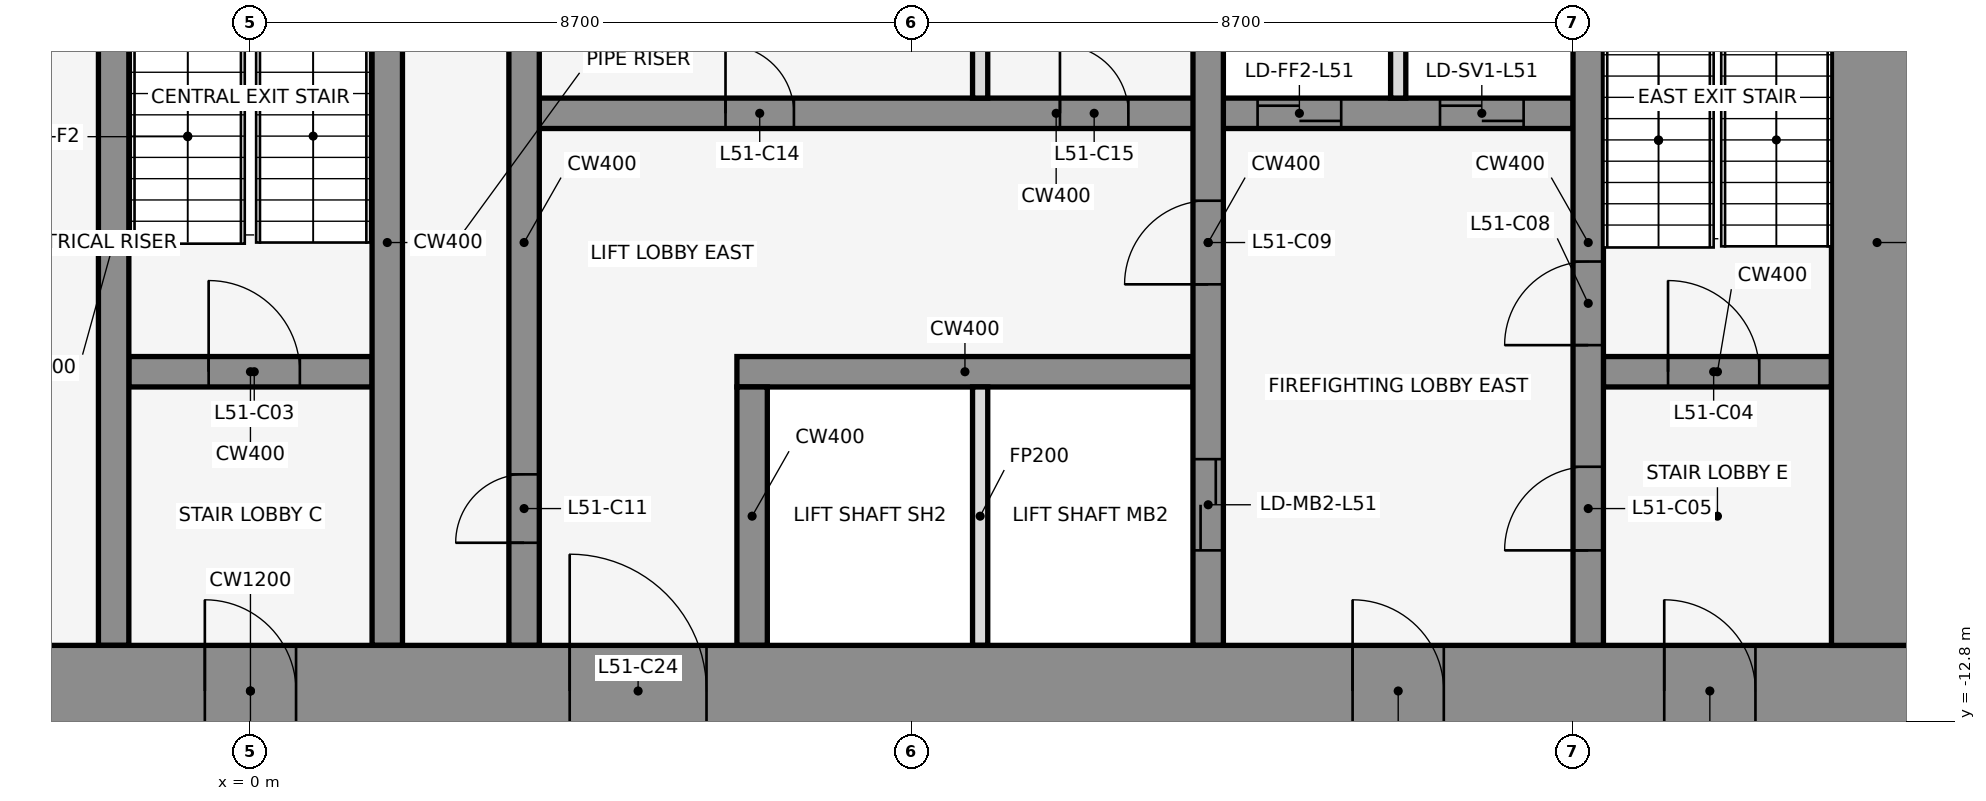
"""IFC4 building model, lengths in metres.
Left out: names, types, materials, properties, quantities, classifications, styles, units other than length and angle.
Written with IfcOpenShell. Run it as: python <this file> out.ifc"""

import sys

from ifc_helpers import new_model, si_unit, direction, frame, frame_2d, origin, place, context, subcontext, project, spatial, rectangle, extrude, element, fill, save


model = new_model("IFC4")
c1 = context("Model", 3, precision=1e-05, world=origin(), true_north=direction((0.0, 1.0)))
c2 = subcontext(c1, "Body", "Model", "MODEL_VIEW")
j1 = project(units=[si_unit("LENGTHUNIT", "METRE"), si_unit("PLANEANGLEUNIT", "RADIAN")], contexts=[c1])
p1 = place(None, origin())
s1 = spatial("IfcSite", under=j1, at=p1, CompositionType="ELEMENT")
p2 = place(p1, origin())
s2 = spatial("IfcBuilding", under=s1, at=p2, CompositionType="ELEMENT")
p3 = place(p2, frame((0.0, 0.0, 227.8)))
s3 = spatial("IfcBuildingStorey", under=s2, at=p3, CompositionType="ELEMENT", Elevation=227.8)
p4 = place(p3, frame((-1.6, -8.2, 0.0), z_axis=(0.0, 0.0, 1.0), x_axis=(1.0, 0.0, 0.0)))
e1 = element("IfcWall", 1, at=p4, inside=s3, PredefinedType="SHEAR", context=c2, shape_type="SweptSolid", body=[
    extrude(rectangle(XDim=3.2, YDim=0.4, at=frame_2d((1.6, 0.0))), origin(), (0.0, 0.0, 1.0), 4.1),
])
p5 = place(p4, frame((1.05, 0.0, 0.0)))
e2 = element("IfcOpeningElement", 2, at=p5, cuts=e1, PredefinedType="OPENING", context=c2, shape_type="SweptSolid", body=[
    extrude(rectangle(XDim=1.2, YDim=2.1, at=frame_2d((0.6, 1.05))), frame((0.0, 0.212, 0.0), z_axis=(0.0, -1.0, 0.0), x_axis=(1.0, 0.0, 0.0)), (0.0, 0.0, 1.0), 0.424),
])
p6 = place(p3, frame((6.4, -8.2, 0.0), z_axis=(0.0, 0.0, 1.0), x_axis=(1.0, 0.0, 0.0)))
e3 = element("IfcWall", 3, at=p6, inside=s3, PredefinedType="SHEAR", context=c2, shape_type="SweptSolid", body=[
    extrude(rectangle(XDim=6.0, YDim=0.4, at=frame_2d((3.0, 0.0))), origin(), (0.0, 0.0, 1.0), 4.1),
])
p7 = place(p3, frame((17.8, -8.2, 0.0), z_axis=(0.0, 0.0, 1.0), x_axis=(1.0, 0.0, 0.0)))
e4 = element("IfcWall", 4, at=p7, inside=s3, PredefinedType="SHEAR", context=c2, shape_type="SweptSolid", body=[
    extrude(rectangle(XDim=3.0, YDim=0.4, at=frame_2d((1.5, 0.0))), origin(), (0.0, 0.0, 1.0), 4.1),
])
p8 = place(p7, frame((0.85, 0.0, 0.0)))
e5 = element("IfcOpeningElement", 5, at=p8, cuts=e4, PredefinedType="OPENING", context=c2, shape_type="SweptSolid", body=[
    extrude(rectangle(XDim=1.2, YDim=2.1, at=frame_2d((0.6, 1.05))), frame((0.0, 0.212, 0.0), z_axis=(0.0, -1.0, 0.0), x_axis=(1.0, 0.0, 0.0)), (0.0, 0.0, 1.0), 0.424),
])
p9 = place(p3, frame((3.8, -4.8, 0.0), z_axis=(0.0, 0.0, 1.0), x_axis=(1.0, 0.0, 0.0)))
e6 = element("IfcWall", 6, at=p9, inside=s3, PredefinedType="SHEAR", context=c2, shape_type="SweptSolid", body=[
    extrude(rectangle(XDim=13.6, YDim=0.4, at=frame_2d((6.8, 0.0))), origin(), (0.0, 0.0, 1.0), 4.1),
])
p10 = place(p9, frame((9.45, 0.0, 0.0)))
e7 = element("IfcOpeningElement", 7, at=p10, cuts=e6, PredefinedType="OPENING", context=c2, shape_type="SweptSolid", body=[
    extrude(rectangle(XDim=1.1, YDim=2.1, at=frame_2d((0.55, 1.05))), frame((0.0, 0.212, 0.0), z_axis=(0.0, -1.0, 0.0), x_axis=(1.0, 0.0, 0.0)), (0.0, 0.0, 1.0), 0.424),
])
p11 = place(p9, frame((11.85, 0.0, 0.0)))
e8 = element("IfcOpeningElement", 8, at=p11, cuts=e6, PredefinedType="OPENING", context=c2, shape_type="SweptSolid", body=[
    extrude(rectangle(XDim=1.1, YDim=2.1, at=frame_2d((0.55, 1.05))), frame((0.0, 0.212, 0.0), z_axis=(0.0, -1.0, 0.0), x_axis=(1.0, 0.0, 0.0)), (0.0, 0.0, 1.0), 0.424),
])
p12 = place(p9, frame((2.45, 0.0, 0.0)))
e9 = element("IfcOpeningElement", 9, at=p12, cuts=e6, PredefinedType="OPENING", context=c2, shape_type="SweptSolid", body=[
    extrude(rectangle(XDim=0.9, YDim=2.1, at=frame_2d((0.45, 1.05))), frame((0.0, 0.212, 0.0), z_axis=(0.0, -1.0, 0.0), x_axis=(1.0, 0.0, 0.0)), (0.0, 0.0, 1.0), 0.424),
])
p13 = place(p9, frame((6.85, 0.0, 0.0)))
e10 = element("IfcOpeningElement", 10, at=p13, cuts=e6, PredefinedType="OPENING", context=c2, shape_type="SweptSolid", body=[
    extrude(rectangle(XDim=0.9, YDim=2.1, at=frame_2d((0.45, 1.05))), frame((0.0, 0.212, 0.0), z_axis=(0.0, -1.0, 0.0), x_axis=(1.0, 0.0, 0.0)), (0.0, 0.0, 1.0), 0.424),
])
for number, where, z_axis, x_axis in (
    (11, (-1.8, -11.8, 0.0), (0.0, 0.0, 1.0), (0.0, 1.0, 0.0)),
    (12, (1.8, -11.8, 0.0), (0.0, 0.0, 1.0), (0.0, 1.0, 0.0)),
):
    element("IfcWall", number, at=place(p3, frame(where, z_axis=z_axis, x_axis=x_axis)), inside=s3, PredefinedType="SHEAR", context=c2, shape_type="SweptSolid", body=[
        extrude(rectangle(XDim=10.6, YDim=0.4, at=frame_2d((5.3, 0.0))), origin(), (0.0, 0.0, 1.0), 4.1),
    ])
p14 = place(p3, frame((3.6, -11.8, 0.0), z_axis=(0.0, 0.0, 1.0), x_axis=(0.0, 1.0, 0.0)))
e13 = element("IfcWall", 13, at=p14, inside=s3, PredefinedType="SHEAR", context=c2, shape_type="SweptSolid", body=[
    extrude(rectangle(XDim=10.6, YDim=0.4, at=frame_2d((5.3, 0.0))), origin(), (0.0, 0.0, 1.0), 4.1),
])
p15 = place(p14, frame((1.35, 0.0, 0.0)))
e14 = element("IfcOpeningElement", 14, at=p15, cuts=e13, PredefinedType="OPENING", context=c2, shape_type="SweptSolid", body=[
    extrude(rectangle(XDim=0.9, YDim=2.1, at=frame_2d((0.45, 1.05))), frame((0.0, 0.212, 0.0), z_axis=(0.0, -1.0, 0.0), x_axis=(1.0, 0.0, 0.0)), (0.0, 0.0, 1.0), 0.424),
])
p16 = place(p3, frame((6.6, -11.8, 0.0), z_axis=(0.0, 0.0, 1.0), x_axis=(0.0, 1.0, 0.0)))
e15 = element("IfcWall", 15, at=p16, inside=s3, PredefinedType="SHEAR", context=c2, shape_type="SweptSolid", body=[
    extrude(rectangle(XDim=3.4, YDim=0.4, at=frame_2d((1.7, 0.0))), origin(), (0.0, 0.0, 1.0), 4.1),
])
for number, where, z_axis, x_axis in (
    (16, (9.6, -11.8, 0.0), (0.0, 0.0, 1.0), (0.0, 1.0, 0.0)),
    (17, (9.6, -4.6, 0.0), (0.0, 0.0, 1.0), (0.0, 1.0, 0.0)),
):
    element("IfcWall", number, at=place(p3, frame(where, z_axis=z_axis, x_axis=x_axis)), inside=s3, PredefinedType="PARTITIONING", context=c2, shape_type="SweptSolid", body=[
        extrude(rectangle(XDim=3.4, YDim=0.2, at=frame_2d((1.7, 0.0))), origin(), (0.0, 0.0, 1.0), 2.84),
    ])
p17 = place(p3, frame((12.6, -11.8, 0.0), z_axis=(0.0, 0.0, 1.0), x_axis=(0.0, 1.0, 0.0)))
e18 = element("IfcWall", 18, at=p17, inside=s3, PredefinedType="SHEAR", context=c2, shape_type="SweptSolid", body=[
    extrude(rectangle(XDim=10.6, YDim=0.4, at=frame_2d((5.3, 0.0))), origin(), (0.0, 0.0, 1.0), 4.1),
])
p18 = place(p17, frame((1.25, 0.0, 0.0)))
e19 = element("IfcOpeningElement", 19, at=p18, cuts=e18, PredefinedType="OPENING", context=c2, shape_type="SweptSolid", body=[
    extrude(rectangle(XDim=1.2, YDim=2.1, at=frame_2d((0.6, 1.05))), frame((0.0, 0.212, 0.0), z_axis=(0.0, -1.0, 0.0), x_axis=(1.0, 0.0, 0.0)), (0.0, 0.0, 1.0), 0.424),
])
p19 = place(p17, frame((4.75, 0.0, 0.0)))
e20 = element("IfcOpeningElement", 20, at=p19, cuts=e18, PredefinedType="OPENING", context=c2, shape_type="SweptSolid", body=[
    extrude(rectangle(XDim=1.1, YDim=2.1, at=frame_2d((0.55, 1.05))), frame((0.0, 0.212, 0.0), z_axis=(0.0, -1.0, 0.0), x_axis=(1.0, 0.0, 0.0)), (0.0, 0.0, 1.0), 0.424),
])
p20 = place(p3, frame((15.1, -4.6, 0.0), z_axis=(0.0, 0.0, 1.0), x_axis=(0.0, 1.0, 0.0)))
e21 = element("IfcWall", 21, at=p20, inside=s3, PredefinedType="PARTITIONING", context=c2, shape_type="SweptSolid", body=[
    extrude(rectangle(XDim=3.4, YDim=0.2, at=frame_2d((1.7, 0.0))), origin(), (0.0, 0.0, 1.0), 2.84),
])
p21 = place(p3, frame((17.6, -11.8, 0.0), z_axis=(0.0, 0.0, 1.0), x_axis=(0.0, 1.0, 0.0)))
e22 = element("IfcWall", 22, at=p21, inside=s3, PredefinedType="SHEAR", context=c2, shape_type="SweptSolid", body=[
    extrude(rectangle(XDim=10.6, YDim=0.4, at=frame_2d((5.3, 0.0))), origin(), (0.0, 0.0, 1.0), 4.1),
])
p22 = place(p21, frame((1.25, 0.0, 0.0)))
e23 = element("IfcOpeningElement", 23, at=p22, cuts=e22, PredefinedType="OPENING", context=c2, shape_type="SweptSolid", body=[
    extrude(rectangle(XDim=1.1, YDim=2.1, at=frame_2d((0.55, 1.05))), frame((0.0, 0.212, 0.0), z_axis=(0.0, -1.0, 0.0), x_axis=(1.0, 0.0, 0.0)), (0.0, 0.0, 1.0), 0.424),
])
p23 = place(p21, frame((3.95, 0.0, 0.0)))
e24 = element("IfcOpeningElement", 24, at=p23, cuts=e22, PredefinedType="OPENING", context=c2, shape_type="SweptSolid", body=[
    extrude(rectangle(XDim=1.1, YDim=2.1, at=frame_2d((0.55, 1.05))), frame((0.0, 0.212, 0.0), z_axis=(0.0, -1.0, 0.0), x_axis=(1.0, 0.0, 0.0)), (0.0, 0.0, 1.0), 0.424),
])
p24 = place(p3, frame((-22.0, -12.4, 0.0), z_axis=(0.0, 0.0, 1.0), x_axis=(1.0, 0.0, 0.0)))
e25 = element("IfcWall", 25, at=p24, inside=s3, PredefinedType="SHEAR", context=c2, shape_type="SweptSolid", body=[
    extrude(rectangle(XDim=44.0, YDim=1.2, at=frame_2d((22.0, 0.0))), origin(), (0.0, 0.0, 1.0), 4.1),
])
p25 = place(p24, frame((2.2, 0.0, 0.0)))
e26 = element("IfcOpeningElement", 26, at=p25, cuts=e25, PredefinedType="OPENING", context=c2, shape_type="SweptSolid", body=[
    extrude(rectangle(XDim=1.2, YDim=2.1, at=frame_2d((0.6, 1.05))), frame((0.0, 0.612, 0.0), z_axis=(0.0, -1.0, 0.0), x_axis=(1.0, 0.0, 0.0)), (0.0, 0.0, 1.0), 1.224),
])
p26 = place(p24, frame((21.4, 0.0, 0.0)))
e27 = element("IfcOpeningElement", 27, at=p26, cuts=e25, PredefinedType="OPENING", context=c2, shape_type="SweptSolid", body=[
    extrude(rectangle(XDim=1.2, YDim=2.1, at=frame_2d((0.6, 1.05))), frame((0.0, 0.612, 0.0), z_axis=(0.0, -1.0, 0.0), x_axis=(1.0, 0.0, 0.0)), (0.0, 0.0, 1.0), 1.224),
])
p27 = place(p24, frame((40.6, 0.0, 0.0)))
e28 = element("IfcOpeningElement", 28, at=p27, cuts=e25, PredefinedType="OPENING", context=c2, shape_type="SweptSolid", body=[
    extrude(rectangle(XDim=1.2, YDim=2.1, at=frame_2d((0.6, 1.05))), frame((0.0, 0.612, 0.0), z_axis=(0.0, -1.0, 0.0), x_axis=(1.0, 0.0, 0.0)), (0.0, 0.0, 1.0), 1.224),
])
p28 = place(p24, frame((16.0, 0.0, 0.0)))
e29 = element("IfcOpeningElement", 29, at=p28, cuts=e25, PredefinedType="OPENING", context=c2, shape_type="SweptSolid", body=[
    extrude(rectangle(XDim=1.8, YDim=2.1, at=frame_2d((0.9, 1.05))), frame((0.0, 0.612, 0.0), z_axis=(0.0, -1.0, 0.0), x_axis=(1.0, 0.0, 0.0)), (0.0, 0.0, 1.0), 1.224),
])
p29 = place(p24, frame((6.3, 0.0, 0.0)))
e30 = element("IfcOpeningElement", 30, at=p29, cuts=e25, PredefinedType="OPENING", context=c2, shape_type="SweptSolid", body=[
    extrude(rectangle(XDim=1.2, YDim=2.1, at=frame_2d((0.6, 1.05))), frame((0.0, 0.612, 0.0), z_axis=(0.0, -1.0, 0.0), x_axis=(1.0, 0.0, 0.0)), (0.0, 0.0, 1.0), 1.224),
])
p30 = place(p24, frame((26.2, 0.0, 0.0)))
e31 = element("IfcOpeningElement", 31, at=p30, cuts=e25, PredefinedType="OPENING", context=c2, shape_type="SweptSolid", body=[
    extrude(rectangle(XDim=1.8, YDim=2.1, at=frame_2d((0.9, 1.05))), frame((0.0, 0.612, 0.0), z_axis=(0.0, -1.0, 0.0), x_axis=(1.0, 0.0, 0.0)), (0.0, 0.0, 1.0), 1.224),
])
p31 = place(p24, frame((36.5, 0.0, 0.0)))
e32 = element("IfcOpeningElement", 32, at=p31, cuts=e25, PredefinedType="OPENING", context=c2, shape_type="SweptSolid", body=[
    extrude(rectangle(XDim=1.2, YDim=2.1, at=frame_2d((0.6, 1.05))), frame((0.0, 0.612, 0.0), z_axis=(0.0, -1.0, 0.0), x_axis=(1.0, 0.0, 0.0)), (0.0, 0.0, 1.0), 1.224),
])
p32 = place(p3, frame((21.4, -11.8, 0.0), z_axis=(0.0, 0.0, 1.0), x_axis=(0.0, 1.0, 0.0)))
e33 = element("IfcWall", 33, at=p32, inside=s3, PredefinedType="SHEAR", context=c2, shape_type="SweptSolid", body=[
    extrude(rectangle(XDim=10.6, YDim=1.2, at=frame_2d((5.3, 0.0))), origin(), (0.0, 0.0, 1.0), 4.1),
])
p33 = place(p5, origin())
e34 = element("IfcDoor", 34, at=p33, inside=s3, OperationType="SINGLE_SWING_LEFT", PredefinedType="DOOR", context=c2, shape_type="SweptSolid", body=[
    extrude(rectangle(XDim=1.2, YDim=2.1, at=frame_2d((0.6, 1.05))), frame((0.0, 0.025, 0.0), z_axis=(0.0, -1.0, 0.0), x_axis=(1.0, 0.0, 0.0)), (0.0, 0.0, 1.0), 0.05),
])
fill(e2, e34)
p34 = place(p8, origin())
e35 = element("IfcDoor", 35, at=p34, inside=s3, OperationType="SINGLE_SWING_RIGHT", PredefinedType="DOOR", context=c2, shape_type="SweptSolid", body=[
    extrude(rectangle(XDim=1.2, YDim=2.1, at=frame_2d((0.6, 1.05))), frame((0.0, 0.025, 0.0), z_axis=(0.0, -1.0, 0.0), x_axis=(1.0, 0.0, 0.0)), (0.0, 0.0, 1.0), 0.05),
])
fill(e5, e35)
p35 = place(p22, origin())
e36 = element("IfcDoor", 36, at=p35, inside=s3, OperationType="SINGLE_SWING_LEFT", PredefinedType="DOOR", context=c2, shape_type="SweptSolid", body=[
    extrude(rectangle(XDim=1.1, YDim=2.1, at=frame_2d((0.55, 1.05))), frame((0.0, 0.025, 0.0), z_axis=(0.0, -1.0, 0.0), x_axis=(1.0, 0.0, 0.0)), (0.0, 0.0, 1.0), 0.05),
])
fill(e23, e36)
p36 = place(p18, origin())
e37 = element("IfcDoor", 37, at=p36, inside=s3, OperationType="DOUBLE_DOOR_SLIDING", PredefinedType="DOOR", context=c2, shape_type="SweptSolid", body=[
    extrude(rectangle(XDim=1.2, YDim=2.1, at=frame_2d((0.6, 1.05))), frame((0.0, 0.025, 0.0), z_axis=(0.0, -1.0, 0.0), x_axis=(1.0, 0.0, 0.0)), (0.0, 0.0, 1.0), 0.05),
])
fill(e19, e37)
p37 = place(p10, origin())
e38 = element("IfcDoor", 38, at=p37, inside=s3, OperationType="DOUBLE_DOOR_SLIDING", PredefinedType="DOOR", context=c2, shape_type="SweptSolid", body=[
    extrude(rectangle(XDim=1.1, YDim=2.1, at=frame_2d((0.55, 1.05))), frame((0.0, 0.025, 0.0), z_axis=(0.0, -1.0, 0.0), x_axis=(1.0, 0.0, 0.0)), (0.0, 0.0, 1.0), 0.05),
])
fill(e7, e38)
p38 = place(p11, origin())
e39 = element("IfcDoor", 39, at=p38, inside=s3, OperationType="DOUBLE_DOOR_SLIDING", PredefinedType="DOOR", context=c2, shape_type="SweptSolid", body=[
    extrude(rectangle(XDim=1.1, YDim=2.1, at=frame_2d((0.55, 1.05))), frame((0.0, 0.025, 0.0), z_axis=(0.0, -1.0, 0.0), x_axis=(1.0, 0.0, 0.0)), (0.0, 0.0, 1.0), 0.05),
])
fill(e8, e39)
p39 = place(p23, origin())
e40 = element("IfcDoor", 40, at=p39, inside=s3, OperationType="SINGLE_SWING_RIGHT", PredefinedType="DOOR", context=c2, shape_type="SweptSolid", body=[
    extrude(rectangle(XDim=1.1, YDim=2.1, at=frame_2d((0.55, 1.05))), frame((0.0, 0.025, 0.0), z_axis=(0.0, -1.0, 0.0), x_axis=(1.0, 0.0, 0.0)), (0.0, 0.0, 1.0), 0.05),
])
fill(e24, e40)
p40 = place(p19, frame((1.1, 0.0, 0.0), z_axis=(0.0, 0.0, 1.0), x_axis=(-1.0, 0.0, 0.0)))
e41 = element("IfcDoor", 41, at=p40, inside=s3, OperationType="SINGLE_SWING_RIGHT", PredefinedType="DOOR", context=c2, shape_type="SweptSolid", body=[
    extrude(rectangle(XDim=1.1, YDim=2.1, at=frame_2d((0.55, 1.05))), frame((0.0, 0.025, 0.0), z_axis=(0.0, -1.0, 0.0), x_axis=(1.0, 0.0, 0.0)), (0.0, 0.0, 1.0), 0.05),
])
fill(e20, e41)
p41 = place(p15, origin())
e42 = element("IfcDoor", 42, at=p41, inside=s3, OperationType="SINGLE_SWING_LEFT", PredefinedType="DOOR", context=c2, shape_type="SweptSolid", body=[
    extrude(rectangle(XDim=0.9, YDim=2.1, at=frame_2d((0.45, 1.05))), frame((0.0, 0.025, 0.0), z_axis=(0.0, -1.0, 0.0), x_axis=(1.0, 0.0, 0.0)), (0.0, 0.0, 1.0), 0.05),
])
fill(e14, e42)
p42 = place(p12, origin())
e43 = element("IfcDoor", 43, at=p42, inside=s3, OperationType="SINGLE_SWING_RIGHT", PredefinedType="DOOR", context=c2, shape_type="SweptSolid", body=[
    extrude(rectangle(XDim=0.9, YDim=2.1, at=frame_2d((0.45, 1.05))), frame((0.0, 0.025, 0.0), z_axis=(0.0, -1.0, 0.0), x_axis=(1.0, 0.0, 0.0)), (0.0, 0.0, 1.0), 0.05),
])
fill(e9, e43)
p43 = place(p13, origin())
e44 = element("IfcDoor", 44, at=p43, inside=s3, OperationType="SINGLE_SWING_LEFT", PredefinedType="DOOR", context=c2, shape_type="SweptSolid", body=[
    extrude(rectangle(XDim=0.9, YDim=2.1, at=frame_2d((0.45, 1.05))), frame((0.0, 0.025, 0.0), z_axis=(0.0, -1.0, 0.0), x_axis=(1.0, 0.0, 0.0)), (0.0, 0.0, 1.0), 0.05),
])
fill(e10, e44)
p44 = place(p26, frame((1.2, 0.0, 0.0), z_axis=(0.0, 0.0, 1.0), x_axis=(-1.0, 0.0, 0.0)))
e45 = element("IfcDoor", 45, at=p44, inside=s3, OperationType="SINGLE_SWING_RIGHT", PredefinedType="DOOR", context=c2, shape_type="SweptSolid", body=[
    extrude(rectangle(XDim=1.2, YDim=2.1, at=frame_2d((0.6, 1.05))), frame((0.0, 0.025, 0.0), z_axis=(0.0, -1.0, 0.0), x_axis=(1.0, 0.0, 0.0)), (0.0, 0.0, 1.0), 0.05),
])
fill(e27, e45)
p45 = place(p27, frame((1.2, 0.0, 0.0), z_axis=(0.0, 0.0, 1.0), x_axis=(-1.0, 0.0, 0.0)))
e46 = element("IfcDoor", 46, at=p45, inside=s3, OperationType="SINGLE_SWING_RIGHT", PredefinedType="DOOR", context=c2, shape_type="SweptSolid", body=[
    extrude(rectangle(XDim=1.2, YDim=2.1, at=frame_2d((0.6, 1.05))), frame((0.0, 0.025, 0.0), z_axis=(0.0, -1.0, 0.0), x_axis=(1.0, 0.0, 0.0)), (0.0, 0.0, 1.0), 0.05),
])
fill(e28, e46)
p46 = place(p30, origin())
e47 = element("IfcDoor", 47, at=p46, inside=s3, OperationType="SINGLE_SWING_LEFT", PredefinedType="DOOR", context=c2, shape_type="SweptSolid", body=[
    extrude(rectangle(XDim=1.8, YDim=2.1, at=frame_2d((0.9, 1.05))), frame((0.0, 0.025, 0.0), z_axis=(0.0, -1.0, 0.0), x_axis=(1.0, 0.0, 0.0)), (0.0, 0.0, 1.0), 0.05),
])
fill(e31, e47)
p47 = place(p31, frame((1.2, 0.0, 0.0), z_axis=(0.0, 0.0, 1.0), x_axis=(-1.0, 0.0, 0.0)))
e48 = element("IfcDoor", 48, at=p47, inside=s3, OperationType="SINGLE_SWING_RIGHT", PredefinedType="DOOR", context=c2, shape_type="SweptSolid", body=[
    extrude(rectangle(XDim=1.2, YDim=2.1, at=frame_2d((0.6, 1.05))), frame((0.0, 0.025, 0.0), z_axis=(0.0, -1.0, 0.0), x_axis=(1.0, 0.0, 0.0)), (0.0, 0.0, 1.0), 0.05),
])
fill(e32, e48)
save(model, sys.argv[1])
